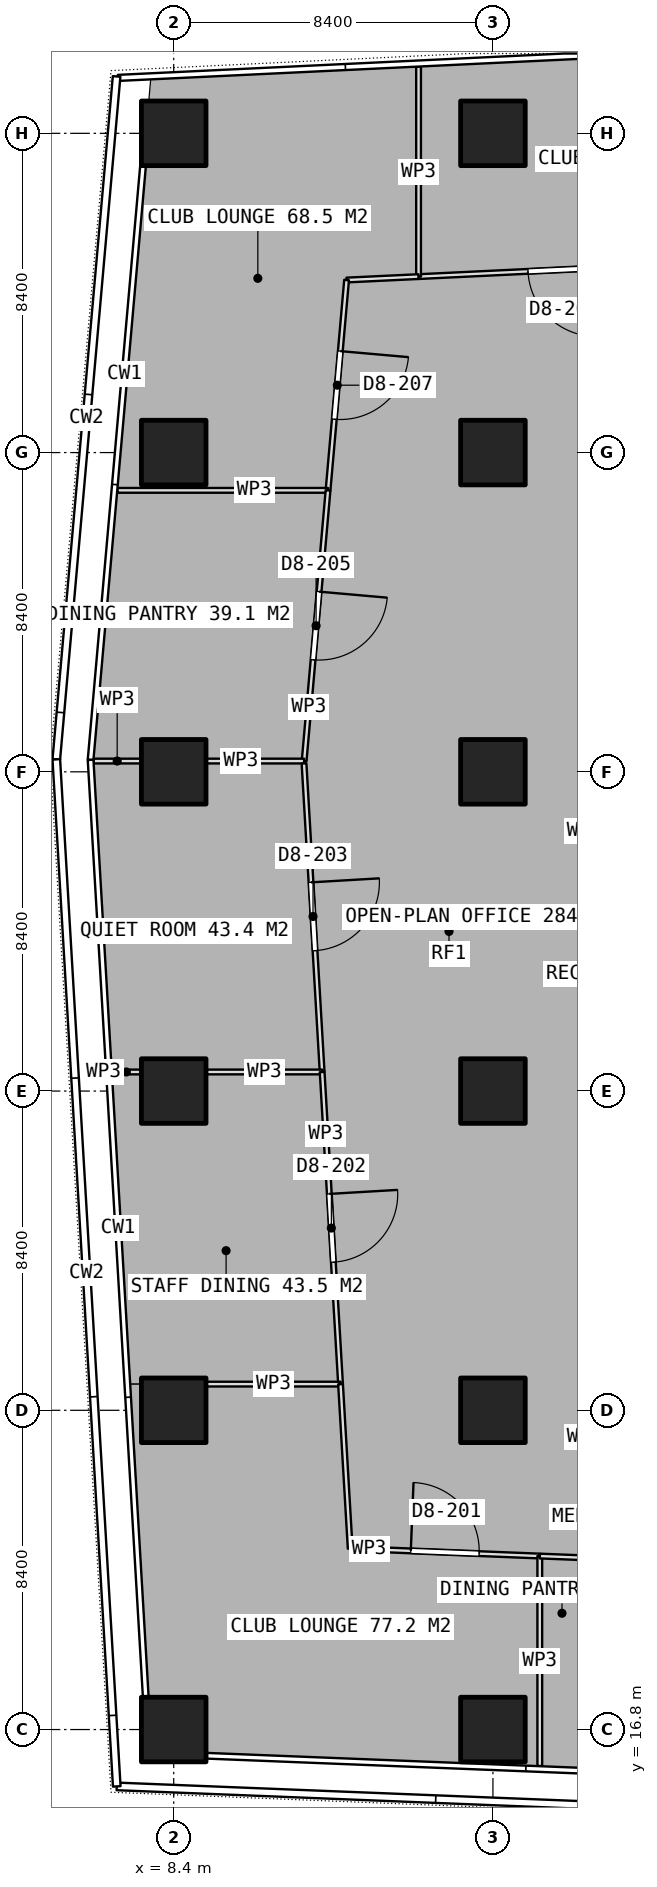
"""IFC4 building model, lengths in metres.
Left out: names, types, materials, properties, quantities, classifications, styles, units other than length and angle.
Written with IfcOpenShell. Run it as: python <this file> out.ifc"""

import sys

from ifc_helpers import new_model, si_unit, direction, frame, frame_2d, origin, origin_2d, place, context, subcontext, project, spatial, rectangle, extrude, element, fill, save


model = new_model("IFC4")
c1 = context("Model", 3, precision=1e-05, world=origin(), true_north=direction((0.0, 1.0)))
c2 = subcontext(c1, "Body", "Model", "MODEL_VIEW")
j1 = project(units=[si_unit("LENGTHUNIT", "METRE"), si_unit("PLANEANGLEUNIT", "RADIAN")], contexts=[c1])
p1 = place(None, origin())
s1 = spatial("IfcSite", under=j1, at=p1, CompositionType="ELEMENT")
p2 = place(p1, origin())
s2 = spatial("IfcBuilding", under=s1, at=p2, CompositionType="ELEMENT")
p3 = place(p2, frame((0.0, 0.0, 176.45)))
s3 = spatial("IfcBuildingStorey", under=s2, at=p3, CompositionType="ELEMENT", Elevation=176.45)
for number, where, z_axis, x_axis in (
    (1, (8.4, 16.8, 0.0), (0.0, 0.0, 1.0), (1.0, 0.0, 0.0)),
    (2, (8.4, 25.2, 0.0), (0.0, 0.0, 1.0), (1.0, 0.0, 0.0)),
    (3, (8.4, 33.6, 0.0), (0.0, 0.0, 1.0), (1.0, 0.0, 0.0)),
    (4, (8.4, 42.0, 0.0), (0.0, 0.0, 1.0), (1.0, 0.0, 0.0)),
    (5, (8.4, 50.4, 0.0), (0.0, 0.0, 1.0), (1.0, 0.0, 0.0)),
    (6, (8.4, 58.8, 0.0), (0.0, 0.0, 1.0), (1.0, 0.0, 0.0)),
    (7, (16.8, 16.8, 0.0), (0.0, 0.0, 1.0), (1.0, 0.0, 0.0)),
    (8, (16.8, 25.2, 0.0), (0.0, 0.0, 1.0), (1.0, 0.0, 0.0)),
    (9, (16.8, 33.6, 0.0), (0.0, 0.0, 1.0), (1.0, 0.0, 0.0)),
    (10, (16.8, 42.0, 0.0), (0.0, 0.0, 1.0), (1.0, 0.0, 0.0)),
    (11, (16.8, 50.4, 0.0), (0.0, 0.0, 1.0), (1.0, 0.0, 0.0)),
    (12, (16.8, 58.8, 0.0), (0.0, 0.0, 1.0), (1.0, 0.0, 0.0)),
):
    element("IfcColumn", number, at=place(p3, frame(where, z_axis=z_axis, x_axis=x_axis)), inside=s3, PredefinedType="COLUMN", context=c2, shape_type="SweptSolid", body=[
        extrude(rectangle(XDim=1.7, YDim=1.7, at=origin_2d()), origin(), (0.0, 0.0, 1.0), 3.75),
    ])
p4 = place(p3, frame((22.4, 55.392, 0.0), z_axis=(0.0, 0.0, 1.0), x_axis=(-0.998854223515, -0.047856453768, 0.0)))
e13 = element("IfcWall", 13, at=p4, inside=s3, PredefinedType="PARTITIONING", context=c2, shape_type="SweptSolid", body=[
    extrude(rectangle(XDim=7.566, YDim=0.125, at=frame_2d((3.783, 0.0))), origin(), (0.0, 0.0, 1.0), 3.5),
])
p5 = place(p4, frame((2.883, 0.0, 0.0)))
e14 = element("IfcOpeningElement", 14, at=p5, cuts=e13, PredefinedType="OPENING", context=c2, shape_type="SweptSolid", body=[
    extrude(rectangle(XDim=1.8, YDim=2.1, at=frame_2d((0.9, 1.05))), frame((0.0, 0.073, 0.0), z_axis=(0.0, -1.0, 0.0), x_axis=(1.0, 0.0, 0.0)), (0.0, 0.0, 1.0), 0.145),
])
p6 = place(p3, frame((14.843, 55.03, 0.0), z_axis=(0.0, 0.0, 1.0), x_axis=(0.0, 1.0, 0.0)))
e15 = element("IfcWall", 15, at=p6, inside=s3, PredefinedType="PARTITIONING", context=c2, shape_type="SweptSolid", body=[
    extrude(rectangle(XDim=5.527, YDim=0.125, at=frame_2d((2.763, 0.0))), origin(), (0.0, 0.0, 1.0), 3.5),
])
p7 = place(p3, frame((14.842, 55.03, 0.0), z_axis=(0.0, 0.0, 1.0), x_axis=(-0.998869594494, -0.047534547378, 0.0)))
e16 = element("IfcWall", 16, at=p7, inside=s3, PredefinedType="PARTITIONING", context=c2, shape_type="SweptSolid", body=[
    extrude(rectangle(XDim=1.895, YDim=0.125, at=frame_2d((0.948, 0.0))), origin(), (0.0, 0.0, 1.0), 3.5),
])
p8 = place(p3, frame((12.949, 54.94, 0.0), z_axis=(0.0, 0.0, 1.0), x_axis=(-0.087848920717, -0.996133809851, 0.0)))
e17 = element("IfcWall", 17, at=p8, inside=s3, PredefinedType="PARTITIONING", context=c2, shape_type="SweptSolid", body=[
    extrude(rectangle(XDim=5.555, YDim=0.125, at=frame_2d((2.778, 0.0))), origin(), (0.0, 0.0, 1.0), 3.5),
])
p9 = place(p8, frame((1.878, 0.0, 0.0)))
e18 = element("IfcOpeningElement", 18, at=p9, cuts=e17, PredefinedType="OPENING", context=c2, shape_type="SweptSolid", body=[
    extrude(rectangle(XDim=1.8, YDim=2.1, at=frame_2d((0.9, 1.05))), frame((0.0, 0.073, 0.0), z_axis=(0.0, -1.0, 0.0), x_axis=(1.0, 0.0, 0.0)), (0.0, 0.0, 1.0), 0.145),
])
p10 = place(p3, frame((12.461, 49.406, 0.0), z_axis=(0.0, 0.0, 1.0), x_axis=(-1.0, 0.0, 0.0)))
e19 = element("IfcWall", 19, at=p10, inside=s3, PredefinedType="PARTITIONING", context=c2, shape_type="SweptSolid", body=[
    extrude(rectangle(XDim=5.542, YDim=0.125, at=frame_2d((2.771, 0.0))), origin(), (0.0, 0.0, 1.0), 3.5),
])
p11 = place(p3, frame((12.461, 49.405, 0.0), z_axis=(0.0, 0.0, 1.0), x_axis=(-0.087961575655, -0.996123868406, 0.0)))
e20 = element("IfcWall", 20, at=p11, inside=s3, PredefinedType="PARTITIONING", context=c2, shape_type="SweptSolid", body=[
    extrude(rectangle(XDim=7.15, YDim=0.125, at=frame_2d((3.575, 0.0))), origin(), (0.0, 0.0, 1.0), 3.5),
])
p12 = place(p11, frame((2.675, 0.0, 0.0)))
e21 = element("IfcOpeningElement", 21, at=p12, cuts=e20, PredefinedType="OPENING", context=c2, shape_type="SweptSolid", body=[
    extrude(rectangle(XDim=1.8, YDim=2.1, at=frame_2d((0.9, 1.05))), frame((0.0, 0.073, 0.0), z_axis=(0.0, -1.0, 0.0), x_axis=(1.0, 0.0, 0.0)), (0.0, 0.0, 1.0), 0.145),
])
p13 = place(p3, frame((11.832, 42.283, 0.0), z_axis=(0.0, 0.0, 1.0), x_axis=(-1.0, 0.0, 0.0)))
e22 = element("IfcWall", 22, at=p13, inside=s3, PredefinedType="PARTITIONING", context=c2, shape_type="SweptSolid", body=[
    extrude(rectangle(XDim=2.562, YDim=0.125, at=frame_2d((1.281, 0.0))), origin(), (0.0, 0.0, 1.0), 3.5),
])
p14 = place(p3, frame((7.53, 42.283, 0.0), z_axis=(0.0, 0.0, 1.0), x_axis=(-1.0, 0.0, 0.0)))
e23 = element("IfcWall", 23, at=p14, inside=s3, PredefinedType="PARTITIONING", context=c2, shape_type="SweptSolid", body=[
    extrude(rectangle(XDim=1.235, YDim=0.125, at=frame_2d((0.618, 0.0))), origin(), (0.0, 0.0, 1.0), 3.5),
])
p15 = place(p3, frame((11.829, 42.221, 0.0), z_axis=(0.0, 0.0, 1.0), x_axis=(0.058626996203, -0.998279958387, 0.0)))
e24 = element("IfcWall", 24, at=p15, inside=s3, PredefinedType="PARTITIONING", context=c2, shape_type="SweptSolid", body=[
    extrude(rectangle(XDim=8.133, YDim=0.125, at=frame_2d((4.066, 0.0))), origin(), (0.0, 0.0, 1.0), 3.5),
])
p16 = place(p15, frame((3.135, 0.0, 0.0)))
e25 = element("IfcOpeningElement", 25, at=p16, cuts=e24, PredefinedType="OPENING", context=c2, shape_type="SweptSolid", body=[
    extrude(rectangle(XDim=1.8, YDim=2.1, at=frame_2d((0.9, 1.05))), frame((0.0, 0.073, 0.0), z_axis=(0.0, -1.0, 0.0), x_axis=(1.0, 0.0, 0.0)), (0.0, 0.0, 1.0), 0.145),
])
p17 = place(p3, frame((12.306, 34.102, 0.0), z_axis=(0.0, 0.0, 1.0), x_axis=(-1.0, 0.0, 0.0)))
e26 = element("IfcWall", 26, at=p17, inside=s3, PredefinedType="PARTITIONING", context=c2, shape_type="SweptSolid", body=[
    extrude(rectangle(XDim=3.036, YDim=0.125, at=frame_2d((1.518, 0.0))), origin(), (0.0, 0.0, 1.0), 3.5),
])
p18 = place(p3, frame((7.53, 34.102, 0.0), z_axis=(0.0, 0.0, 1.0), x_axis=(-1.0, 0.0, 0.0)))
e27 = element("IfcWall", 27, at=p18, inside=s3, PredefinedType="PARTITIONING", context=c2, shape_type="SweptSolid", body=[
    extrude(rectangle(XDim=0.753, YDim=0.125, at=frame_2d((0.376, 0.0))), origin(), (0.0, 0.0, 1.0), 3.5),
])
p19 = place(p3, frame((12.306, 34.101, 0.0), z_axis=(0.0, 0.0, 1.0), x_axis=(0.058850761021, -0.998266791959, 0.0)))
e28 = element("IfcWall", 28, at=p19, inside=s3, PredefinedType="PARTITIONING", context=c2, shape_type="SweptSolid", body=[
    extrude(rectangle(XDim=8.226, YDim=0.125, at=frame_2d((4.113, 0.0))), origin(), (0.0, 0.0, 1.0), 3.5),
])
p20 = place(p19, frame((3.213, 0.0, 0.0)))
e29 = element("IfcOpeningElement", 29, at=p20, cuts=e28, PredefinedType="OPENING", context=c2, shape_type="SweptSolid", body=[
    extrude(rectangle(XDim=1.8, YDim=2.1, at=frame_2d((0.9, 1.05))), frame((0.0, 0.073, 0.0), z_axis=(0.0, -1.0, 0.0), x_axis=(1.0, 0.0, 0.0)), (0.0, 0.0, 1.0), 0.145),
])
p21 = place(p3, frame((12.79, 25.889, 0.0), z_axis=(0.0, 0.0, 1.0), x_axis=(-1.0, 0.0, 0.0)))
e30 = element("IfcWall", 30, at=p21, inside=s3, PredefinedType="PARTITIONING", context=c2, shape_type="SweptSolid", body=[
    extrude(rectangle(XDim=3.52, YDim=0.125, at=frame_2d((1.76, 0.0))), origin(), (0.0, 0.0, 1.0), 3.5),
])
p22 = place(p3, frame((12.79, 25.888, 0.0), z_axis=(0.0, 0.0, 1.0), x_axis=(0.058619592845, -0.998280393144, 0.0)))
e31 = element("IfcWall", 31, at=p22, inside=s3, PredefinedType="PARTITIONING", context=c2, shape_type="SweptSolid", body=[
    extrude(rectangle(XDim=4.332, YDim=0.125, at=frame_2d((2.166, 0.0))), origin(), (0.0, 0.0, 1.0), 3.5),
])
p23 = place(p3, frame((13.044, 21.564, 0.0), z_axis=(0.0, 0.0, 1.0), x_axis=(0.999205638445, -0.039850873273, 0.0)))
e32 = element("IfcWall", 32, at=p23, inside=s3, PredefinedType="PARTITIONING", context=c2, shape_type="SweptSolid", body=[
    extrude(rectangle(XDim=4.993, YDim=0.125, at=frame_2d((2.497, 0.0))), origin(), (0.0, 0.0, 1.0), 3.5),
])
p24 = place(p23, frame((1.596, 0.0, 0.0)))
e33 = element("IfcOpeningElement", 33, at=p24, cuts=e32, PredefinedType="OPENING", context=c2, shape_type="SweptSolid", body=[
    extrude(rectangle(XDim=1.8, YDim=2.1, at=frame_2d((0.9, 1.05))), frame((0.0, 0.073, 0.0), z_axis=(0.0, -1.0, 0.0), x_axis=(1.0, 0.0, 0.0)), (0.0, 0.0, 1.0), 0.145),
])
p25 = place(p3, frame((18.033, 21.365, 0.0), z_axis=(0.0, 0.0, 1.0), x_axis=(0.0, -1.0, 0.0)))
e34 = element("IfcWall", 34, at=p25, inside=s3, PredefinedType="PARTITIONING", context=c2, shape_type="SweptSolid", body=[
    extrude(rectangle(XDim=5.524, YDim=0.125, at=frame_2d((2.762, 0.0))), origin(), (0.0, 0.0, 1.0), 3.5),
])
p26 = place(p3, frame((18.034, 21.365, 0.0), z_axis=(0.0, 0.0, 1.0), x_axis=(0.999225413712, -0.039351907096, 0.0)))
e35 = element("IfcWall", 35, at=p26, inside=s3, PredefinedType="PARTITIONING", context=c2, shape_type="SweptSolid", body=[
    extrude(rectangle(XDim=1.092, YDim=0.125, at=frame_2d((0.546, 0.0))), origin(), (0.0, 0.0, 1.0), 3.5),
])
p27 = place(p5, origin())
e36 = element("IfcDoor", 36, at=p27, inside=s3, OperationType="DOUBLE_DOOR_SINGLE_SWING", PredefinedType="DOOR", context=c2, shape_type="SweptSolid", body=[
    extrude(rectangle(XDim=1.8, YDim=2.1, at=frame_2d((0.9, 1.05))), frame((0.0, 0.025, 0.0), z_axis=(0.0, -1.0, 0.0), x_axis=(1.0, 0.0, 0.0)), (0.0, 0.0, 1.0), 0.05),
])
fill(e14, e36)
p28 = place(p9, origin())
e37 = element("IfcDoor", 37, at=p28, inside=s3, OperationType="DOUBLE_DOOR_SINGLE_SWING", PredefinedType="DOOR", context=c2, shape_type="SweptSolid", body=[
    extrude(rectangle(XDim=1.8, YDim=2.1, at=frame_2d((0.9, 1.05))), frame((0.0, 0.025, 0.0), z_axis=(0.0, -1.0, 0.0), x_axis=(1.0, 0.0, 0.0)), (0.0, 0.0, 1.0), 0.05),
])
fill(e18, e37)
p29 = place(p12, origin())
e38 = element("IfcDoor", 38, at=p29, inside=s3, OperationType="DOUBLE_DOOR_SINGLE_SWING", PredefinedType="DOOR", context=c2, shape_type="SweptSolid", body=[
    extrude(rectangle(XDim=1.8, YDim=2.1, at=frame_2d((0.9, 1.05))), frame((0.0, 0.025, 0.0), z_axis=(0.0, -1.0, 0.0), x_axis=(1.0, 0.0, 0.0)), (0.0, 0.0, 1.0), 0.05),
])
fill(e21, e38)
p30 = place(p16, origin())
e39 = element("IfcDoor", 39, at=p30, inside=s3, OperationType="DOUBLE_DOOR_SINGLE_SWING", PredefinedType="DOOR", context=c2, shape_type="SweptSolid", body=[
    extrude(rectangle(XDim=1.8, YDim=2.1, at=frame_2d((0.9, 1.05))), frame((0.0, 0.025, 0.0), z_axis=(0.0, -1.0, 0.0), x_axis=(1.0, 0.0, 0.0)), (0.0, 0.0, 1.0), 0.05),
])
fill(e25, e39)
p31 = place(p20, origin())
e40 = element("IfcDoor", 40, at=p31, inside=s3, OperationType="DOUBLE_DOOR_SINGLE_SWING", PredefinedType="DOOR", context=c2, shape_type="SweptSolid", body=[
    extrude(rectangle(XDim=1.8, YDim=2.1, at=frame_2d((0.9, 1.05))), frame((0.0, 0.025, 0.0), z_axis=(0.0, -1.0, 0.0), x_axis=(1.0, 0.0, 0.0)), (0.0, 0.0, 1.0), 0.05),
])
fill(e29, e40)
p32 = place(p24, origin())
e41 = element("IfcDoor", 41, at=p32, inside=s3, OperationType="DOUBLE_DOOR_SINGLE_SWING", PredefinedType="DOOR", context=c2, shape_type="SweptSolid", body=[
    extrude(rectangle(XDim=1.8, YDim=2.1, at=frame_2d((0.9, 1.05))), frame((0.0, 0.025, 0.0), z_axis=(0.0, -1.0, 0.0), x_axis=(1.0, 0.0, 0.0)), (0.0, 0.0, 1.0), 0.05),
])
fill(e33, e41)
save(model, sys.argv[1])
